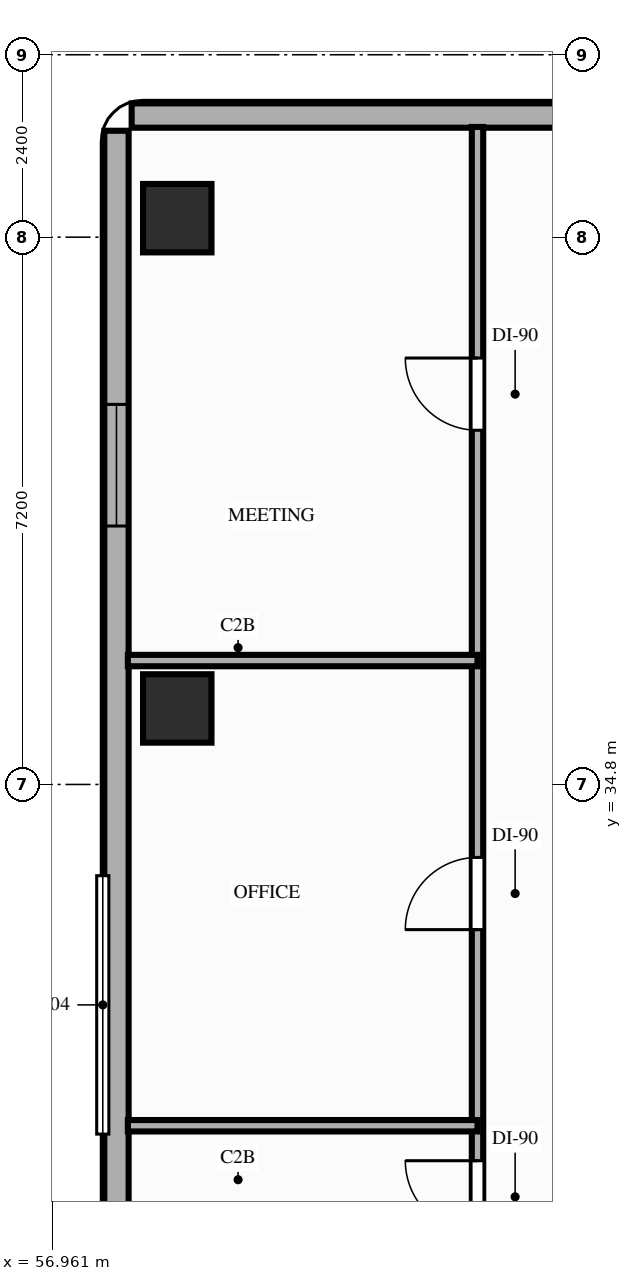
"""IFC4 building model, lengths in metres.
Left out: names, types, materials, properties, quantities, classifications, styles, units other than length and angle.
Written with IfcOpenShell. Run it as: python <this file> out.ifc"""

import sys

from ifc_helpers import new_model, si_unit, direction, frame, frame_2d, origin, origin_2d, place, context, subcontext, project, spatial, rectangle, extrude, element, fill, save


model = new_model("IFC4")
c1 = context("Model", 3, precision=1e-05, world=origin(), true_north=direction((0.0, 1.0)))
c2 = subcontext(c1, "Body", "Model", "MODEL_VIEW")
j1 = project(units=[si_unit("LENGTHUNIT", "METRE"), si_unit("PLANEANGLEUNIT", "RADIAN")], contexts=[c1])
p1 = place(None, origin())
s1 = spatial("IfcSite", under=j1, at=p1, CompositionType="ELEMENT")
p2 = place(p1, origin())
s2 = spatial("IfcBuilding", under=s1, at=p2, CompositionType="ELEMENT")
p3 = place(p2, frame((0.0, 0.0, 56.4)))
s3 = spatial("IfcBuildingStorey", under=s2, at=p3, CompositionType="ELEMENT", Elevation=56.4)
for number, where, z_axis, x_axis in (
    (1, (58.6, 35.8, 0.0), (0.0, 0.0, 1.0), (1.0, 0.0, 0.0)),
    (2, (58.6, 42.25, 0.0), (0.0, 0.0, 1.0), (1.0, 0.0, 0.0)),
):
    element("IfcColumn", number, at=place(p3, frame(where, z_axis=z_axis, x_axis=x_axis)), inside=s3, PredefinedType="COLUMN", context=c2, shape_type="SweptSolid", body=[
        extrude(rectangle(XDim=0.9, YDim=0.9, at=origin_2d()), origin(), (0.0, 0.0, 1.0), 3.2),
    ])
p4 = place(p3, frame((57.8, 43.4, 0.0), z_axis=(0.0, 0.0, 1.0), x_axis=(0.0, -1.0, 0.0)))
e3 = element("IfcWall", 3, at=p4, inside=s3, PredefinedType="STANDARD", context=c2, shape_type="SweptSolid", body=[
    extrude(rectangle(XDim=22.6, YDim=0.32, at=frame_2d((11.3, 0.0))), origin(), (0.0, 0.0, 1.0), 2.51),
])
p5 = place(p4, frame((3.6, 0.0, 0.85)))
e4 = element("IfcOpeningElement", 4, at=p5, cuts=e3, PredefinedType="OPENING", context=c2, shape_type="SweptSolid", body=[
    extrude(rectangle(XDim=1.6, YDim=1.36, at=frame_2d((0.8, 0.68))), frame((0.0, 0.17, 0.0), z_axis=(0.0, -1.0, 0.0), x_axis=(1.0, 0.0, 0.0)), (0.0, 0.0, 1.0), 0.34),
])
p6 = place(p3, frame((72.8, 43.6, 0.0), z_axis=(0.0, 0.0, 1.0), x_axis=(-1.0, 0.0, 0.0)))
e5 = element("IfcWall", 5, at=p6, inside=s3, PredefinedType="STANDARD", context=c2, shape_type="SweptSolid", body=[
    extrude(rectangle(XDim=14.8, YDim=0.32, at=frame_2d((7.4, 0.0))), origin(), (0.0, 0.0, 1.0), 3.02),
])
p7 = place(p3, frame((62.55, 20.75, 0.0), z_axis=(0.0, 0.0, 1.0), x_axis=(0.0, 1.0, 0.0)))
e6 = element("IfcWall", 6, at=p7, inside=s3, PredefinedType="PARTITIONING", context=c2, shape_type="SweptSolid", body=[
    extrude(rectangle(XDim=22.7, YDim=0.15, at=frame_2d((11.35, 0.0))), origin(), (0.0, 0.0, 1.0), 2.51),
])
p8 = place(p7, frame((1.05, 0.0, 0.0)))
e7 = element("IfcOpeningElement", 7, at=p8, cuts=e6, PredefinedType="OPENING", context=c2, shape_type="SweptSolid", body=[
    extrude(rectangle(XDim=0.85, YDim=2.1, at=frame_2d((0.425, 1.05))), frame((0.0, 0.085, 0.0), z_axis=(0.0, -1.0, 0.0), x_axis=(1.0, 0.0, 0.0)), (0.0, 0.0, 1.0), 0.17),
])
p9 = place(p7, frame((3.43, 0.0, 0.0)))
e8 = element("IfcOpeningElement", 8, at=p9, cuts=e6, PredefinedType="OPENING", context=c2, shape_type="SweptSolid", body=[
    extrude(rectangle(XDim=0.95, YDim=2.1, at=frame_2d((0.475, 1.05))), frame((0.0, 0.085, 0.0), z_axis=(0.0, -1.0, 0.0), x_axis=(1.0, 0.0, 0.0)), (0.0, 0.0, 1.0), 0.17),
])
p10 = place(p7, frame((8.15, 0.0, 0.0)))
e9 = element("IfcOpeningElement", 9, at=p10, cuts=e6, PredefinedType="OPENING", context=c2, shape_type="SweptSolid", body=[
    extrude(rectangle(XDim=0.95, YDim=2.15, at=frame_2d((0.475, 1.075))), frame((0.0, 0.085, 0.0), z_axis=(0.0, -1.0, 0.0), x_axis=(1.0, 0.0, 0.0)), (0.0, 0.0, 1.0), 0.17),
])
p11 = place(p7, frame((12.14, 0.0, 0.0)))
e10 = element("IfcOpeningElement", 10, at=p11, cuts=e6, PredefinedType="OPENING", context=c2, shape_type="SweptSolid", body=[
    extrude(rectangle(XDim=0.95, YDim=2.15, at=frame_2d((0.475, 1.075))), frame((0.0, 0.085, 0.0), z_axis=(0.0, -1.0, 0.0), x_axis=(1.0, 0.0, 0.0)), (0.0, 0.0, 1.0), 0.17),
])
p12 = place(p7, frame((18.71, 0.0, 0.0)))
e11 = element("IfcOpeningElement", 11, at=p12, cuts=e6, PredefinedType="OPENING", context=c2, shape_type="SweptSolid", body=[
    extrude(rectangle(XDim=0.95, YDim=2.15, at=frame_2d((0.475, 1.075))), frame((0.0, 0.085, 0.0), z_axis=(0.0, -1.0, 0.0), x_axis=(1.0, 0.0, 0.0)), (0.0, 0.0, 1.0), 0.17),
])
for number, where, z_axis, x_axis in (
    (12, (57.95, 30.31, 0.0), (0.0, 0.0, 1.0), (1.0, 0.0, 0.0)),
    (13, (57.95, 36.43, 0.0), (0.0, 0.0, 1.0), (1.0, 0.0, 0.0)),
):
    element("IfcWall", number, at=place(p3, frame(where, z_axis=z_axis, x_axis=x_axis)), inside=s3, PredefinedType="PARTITIONING", context=c2, shape_type="SweptSolid", body=[
        extrude(rectangle(XDim=4.6, YDim=0.15, at=frame_2d((2.3, 0.0))), origin(), (0.0, 0.0, 1.0), 2.51),
    ])
p13 = place(p5, origin())
e14 = element("IfcWindow", 14, at=p13, inside=s3, PartitioningType="SINGLE_PANEL", PredefinedType="WINDOW", context=c2, shape_type="SweptSolid", body=[
    extrude(rectangle(XDim=1.6, YDim=1.36, at=frame_2d((0.8, 0.68))), frame((0.0, 0.03, 0.0), z_axis=(0.0, -1.0, 0.0), x_axis=(1.0, 0.0, 0.0)), (0.0, 0.0, 1.0), 0.06),
])
fill(e4, e14)
p14 = place(p10, origin())
e15 = element("IfcDoor", 15, at=p14, inside=s3, OperationType="SINGLE_SWING_RIGHT", PredefinedType="DOOR", context=c2, shape_type="SweptSolid", body=[
    extrude(rectangle(XDim=0.95, YDim=2.15, at=frame_2d((0.475, 1.075))), frame((0.0, 0.025, 0.0), z_axis=(0.0, -1.0, 0.0), x_axis=(1.0, 0.0, 0.0)), (0.0, 0.0, 1.0), 0.05),
])
fill(e9, e15)
p15 = place(p11, origin())
e16 = element("IfcDoor", 16, at=p15, inside=s3, OperationType="SINGLE_SWING_LEFT", PredefinedType="DOOR", context=c2, shape_type="SweptSolid", body=[
    extrude(rectangle(XDim=0.95, YDim=2.15, at=frame_2d((0.475, 1.075))), frame((0.0, 0.025, 0.0), z_axis=(0.0, -1.0, 0.0), x_axis=(1.0, 0.0, 0.0)), (0.0, 0.0, 1.0), 0.05),
])
fill(e10, e16)
p16 = place(p12, origin())
e17 = element("IfcDoor", 17, at=p16, inside=s3, OperationType="SINGLE_SWING_RIGHT", PredefinedType="DOOR", context=c2, shape_type="SweptSolid", body=[
    extrude(rectangle(XDim=0.95, YDim=2.15, at=frame_2d((0.475, 1.075))), frame((0.0, 0.025, 0.0), z_axis=(0.0, -1.0, 0.0), x_axis=(1.0, 0.0, 0.0)), (0.0, 0.0, 1.0), 0.05),
])
fill(e11, e17)
save(model, sys.argv[1])
